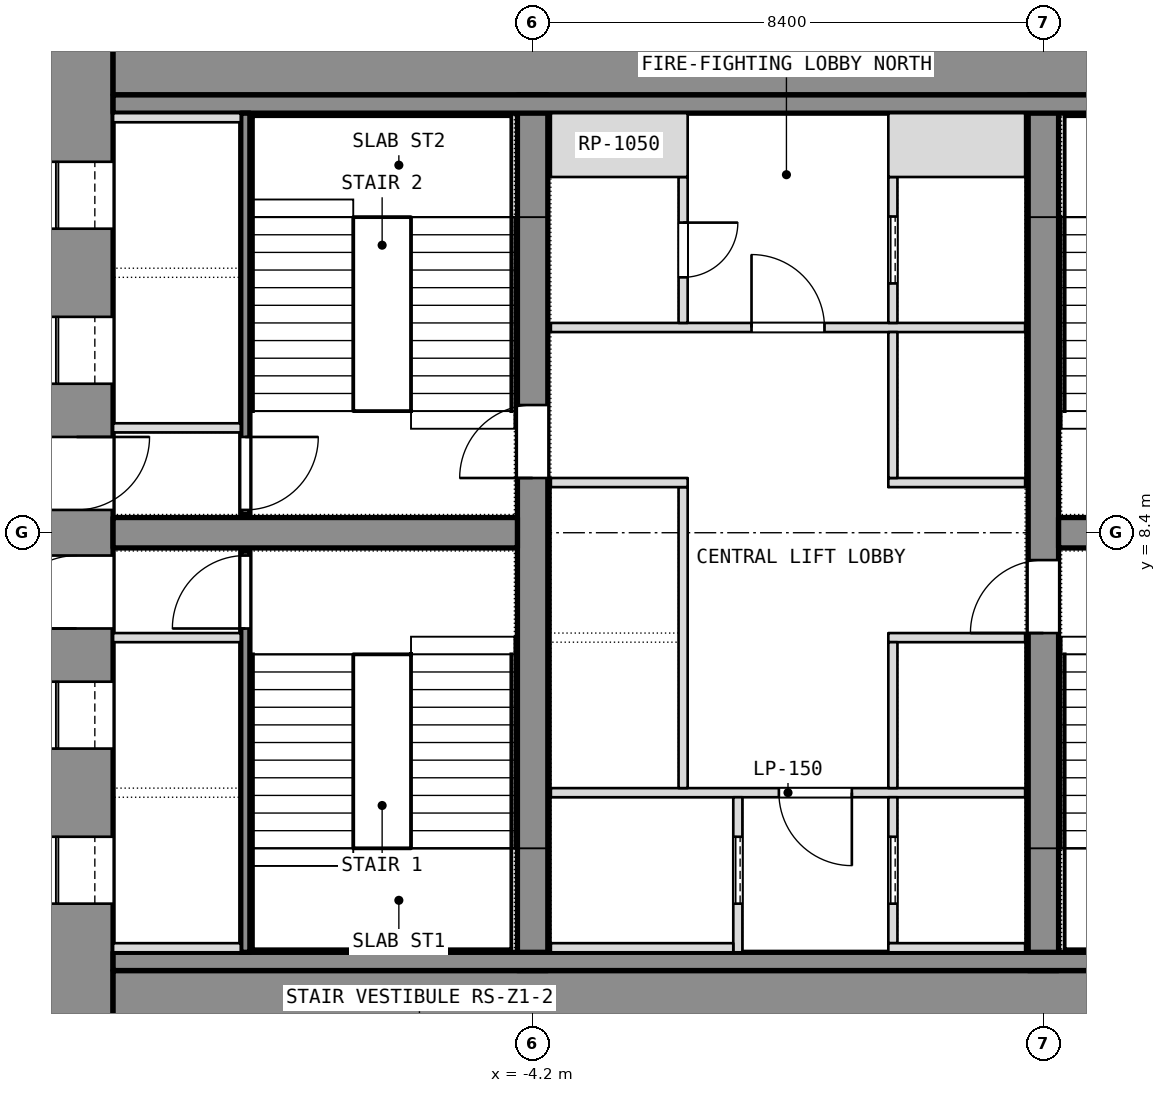
"""IFC4 building model, lengths in metres.
Left out: names, types, materials, properties, quantities, classifications, styles, units other than length and angle.
Written with IfcOpenShell. Run it as: python <this file> out.ifc"""

import sys

from ifc_helpers import new_model, si_unit, direction, frame, frame_2d, origin, place, context, subcontext, project, spatial, rectangle, extrude, element, fill, save


model = new_model("IFC4")
c1 = context("Model", 3, precision=1e-05, world=origin(), true_north=direction((0.0, 1.0)))
c2 = subcontext(c1, "Body", "Model", "MODEL_VIEW")
j1 = project(units=[si_unit("LENGTHUNIT", "METRE"), si_unit("PLANEANGLEUNIT", "RADIAN")], contexts=[c1])
p1 = place(None, origin())
s1 = spatial("IfcSite", under=j1, at=p1, CompositionType="ELEMENT")
p2 = place(p1, origin())
s2 = spatial("IfcBuilding", under=s1, at=p2, CompositionType="ELEMENT")
p3 = place(p2, frame((0.0, 0.0, 76.1)))
s3 = spatial("IfcBuildingStorey", under=s2, at=p3, CompositionType="ELEMENT", Elevation=76.1)
p4 = place(p3, frame((-11.7, 0.0, 0.0), z_axis=(0.0, 0.0, 1.0), x_axis=(0.0, 1.0, 0.0)))
e1 = element("IfcWall", 1, at=p4, inside=s3, PredefinedType="SHEAR", context=c2, shape_type="SweptSolid", body=[
    extrude(rectangle(XDim=16.8, YDim=1.2, at=frame_2d((8.4, 0.0))), origin(), (0.0, 0.0, 1.0), 3.6),
])
p5 = place(p4, frame((2.3, 0.0, 0.0)))
e2 = element("IfcOpeningElement", 2, at=p5, cuts=e1, PredefinedType="OPENING", context=c2, shape_type="SweptSolid", body=[
    extrude(rectangle(XDim=1.1, YDim=2.1, at=frame_2d((0.55, 1.05))), frame((0.0, 0.6, 0.0), z_axis=(0.0, -1.0, 0.0), x_axis=(1.0, 0.0, 0.0)), (0.0, 0.0, 1.0), 1.2),
])
p6 = place(p4, frame((4.85, 0.0, 0.0)))
e3 = element("IfcOpeningElement", 3, at=p6, cuts=e1, PredefinedType="OPENING", context=c2, shape_type="SweptSolid", body=[
    extrude(rectangle(XDim=1.1, YDim=2.1, at=frame_2d((0.55, 1.05))), frame((0.0, 0.6, 0.0), z_axis=(0.0, -1.0, 0.0), x_axis=(1.0, 0.0, 0.0)), (0.0, 0.0, 1.0), 1.2),
])
p7 = place(p4, frame((6.825, 0.0, 0.0)))
e4 = element("IfcOpeningElement", 4, at=p7, cuts=e1, PredefinedType="OPENING", context=c2, shape_type="SweptSolid", body=[
    extrude(rectangle(XDim=1.2, YDim=2.1, at=frame_2d((0.6, 1.05))), frame((0.0, 0.6, 0.0), z_axis=(0.0, -1.0, 0.0), x_axis=(1.0, 0.0, 0.0)), (0.0, 0.0, 1.0), 1.2),
])
p8 = place(p4, frame((13.4, 0.0, 0.0)))
e5 = element("IfcOpeningElement", 5, at=p8, cuts=e1, PredefinedType="OPENING", context=c2, shape_type="SweptSolid", body=[
    extrude(rectangle(XDim=1.1, YDim=2.1, at=frame_2d((0.55, 1.05))), frame((0.0, 0.6, 0.0), z_axis=(0.0, -1.0, 0.0), x_axis=(1.0, 0.0, 0.0)), (0.0, 0.0, 1.0), 1.2),
])
p9 = place(p4, frame((10.85, 0.0, 0.0)))
e6 = element("IfcOpeningElement", 6, at=p9, cuts=e1, PredefinedType="OPENING", context=c2, shape_type="SweptSolid", body=[
    extrude(rectangle(XDim=1.1, YDim=2.1, at=frame_2d((0.55, 1.05))), frame((0.0, 0.6, 0.0), z_axis=(0.0, -1.0, 0.0), x_axis=(1.0, 0.0, 0.0)), (0.0, 0.0, 1.0), 1.2),
])
p10 = place(p4, frame((8.775, 0.0, 0.0)))
e7 = element("IfcOpeningElement", 7, at=p10, cuts=e1, PredefinedType="OPENING", context=c2, shape_type="SweptSolid", body=[
    extrude(rectangle(XDim=1.2, YDim=2.1, at=frame_2d((0.6, 1.05))), frame((0.0, 0.6, 0.0), z_axis=(0.0, -1.0, 0.0), x_axis=(1.0, 0.0, 0.0)), (0.0, 0.0, 1.0), 1.2),
])
for number, where, z_axis, x_axis in (
    (8, (-11.1, 0.6, 0.0), (0.0, 0.0, 1.0), (1.0, 0.0, 0.0)),
    (9, (-11.1, 16.2, 0.0), (0.0, 0.0, 1.0), (1.0, 0.0, 0.0)),
):
    element("IfcWall", number, at=place(p3, frame(where, z_axis=z_axis, x_axis=x_axis)), inside=s3, PredefinedType="SHEAR", context=c2, shape_type="SweptSolid", body=[
        extrude(rectangle(XDim=22.2, YDim=1.2, at=frame_2d((11.1, 0.0))), origin(), (0.0, 0.0, 1.0), 3.6),
    ])
p11 = place(p3, frame((-4.2, 1.2, 0.0), z_axis=(0.0, 0.0, 1.0), x_axis=(0.0, 1.0, 0.0)))
e10 = element("IfcWall", 10, at=p11, inside=s3, PredefinedType="SHEAR", context=c2, shape_type="SweptSolid", body=[
    extrude(rectangle(XDim=14.4, YDim=0.5, at=frame_2d((7.2, 0.0))), origin(), (0.0, 0.0, 1.0), 3.6),
])
p12 = place(p11, frame((8.1, 0.0, 0.0)))
e11 = element("IfcOpeningElement", 11, at=p12, cuts=e10, PredefinedType="OPENING", context=c2, shape_type="SweptSolid", body=[
    extrude(rectangle(XDim=1.2, YDim=2.1, at=frame_2d((0.6, 1.05))), frame((0.0, 0.25, 0.0), z_axis=(0.0, -1.0, 0.0), x_axis=(1.0, 0.0, 0.0)), (0.0, 0.0, 1.0), 0.5),
])
p13 = place(p3, frame((4.2, 1.2, 0.0), z_axis=(0.0, 0.0, 1.0), x_axis=(0.0, 1.0, 0.0)))
e12 = element("IfcWall", 12, at=p13, inside=s3, PredefinedType="SHEAR", context=c2, shape_type="SweptSolid", body=[
    extrude(rectangle(XDim=14.4, YDim=0.5, at=frame_2d((7.2, 0.0))), origin(), (0.0, 0.0, 1.0), 3.6),
])
p14 = place(p13, frame((5.55, 0.0, 0.0)))
e13 = element("IfcOpeningElement", 13, at=p14, cuts=e12, PredefinedType="OPENING", context=c2, shape_type="SweptSolid", body=[
    extrude(rectangle(XDim=1.2, YDim=2.1, at=frame_2d((0.6, 1.05))), frame((0.0, 0.25, 0.0), z_axis=(0.0, -1.0, 0.0), x_axis=(1.0, 0.0, 0.0)), (0.0, 0.0, 1.0), 0.5),
])
for number, where, z_axis, x_axis in (
    (14, (-11.1, 8.4, 0.0), (0.0, 0.0, 1.0), (1.0, 0.0, 0.0)),
    (15, (4.45, 8.4, 0.0), (0.0, 0.0, 1.0), (1.0, 0.0, 0.0)),
):
    element("IfcWall", number, at=place(p3, frame(where, z_axis=z_axis, x_axis=x_axis)), inside=s3, PredefinedType="SHEAR", context=c2, shape_type="SweptSolid", body=[
        extrude(rectangle(XDim=6.65, YDim=0.5, at=frame_2d((3.325, 0.0))), origin(), (0.0, 0.0, 1.0), 3.6),
    ])
for number, where, z_axis, x_axis in (
    (16, (-11.1, 1.35, 0.0), (0.0, 0.0, 1.0), (1.0, 0.0, 0.0)),
    (17, (-11.1, 15.45, 0.0), (0.0, 0.0, 1.0), (1.0, 0.0, 0.0)),
):
    element("IfcWall", number, at=place(p3, frame(where, z_axis=z_axis, x_axis=x_axis)), inside=s3, PredefinedType="PARTITIONING", context=c2, shape_type="SweptSolid", body=[
        extrude(rectangle(XDim=22.2, YDim=0.3, at=frame_2d((11.1, 0.0))), origin(), (0.0, 0.0, 1.0), 3.34),
    ])
p15 = place(p3, frame((-8.925, 1.5, 0.0), z_axis=(0.0, 0.0, 1.0), x_axis=(0.0, 1.0, 0.0)))
e18 = element("IfcWall", 18, at=p15, inside=s3, PredefinedType="SHEAR", context=c2, shape_type="SweptSolid", body=[
    extrude(rectangle(XDim=6.6, YDim=0.15, at=frame_2d((3.3, 0.0))), origin(), (0.0, 0.0, 1.0), 3.34),
])
p16 = place(p15, frame((5.325, 0.0, 0.0)))
e19 = element("IfcOpeningElement", 19, at=p16, cuts=e18, PredefinedType="OPENING", context=c2, shape_type="SweptSolid", body=[
    extrude(rectangle(XDim=1.2, YDim=2.1, at=frame_2d((0.6, 1.05))), frame((0.0, 0.075, 0.0), z_axis=(0.0, -1.0, 0.0), x_axis=(1.0, 0.0, 0.0)), (0.0, 0.0, 1.0), 0.15),
])
for number, where, z_axis, x_axis in (
    (20, (-11.1, 6.675, 0.0), (0.0, 0.0, 1.0), (1.0, 0.0, 0.0)),
    (21, (-11.1, 1.575, 0.0), (0.0, 0.0, 1.0), (1.0, 0.0, 0.0)),
):
    element("IfcWall", number, at=place(p3, frame(where, z_axis=z_axis, x_axis=x_axis)), inside=s3, PredefinedType="SHEAR", context=c2, shape_type="SweptSolid", body=[
        extrude(rectangle(XDim=2.1, YDim=0.15, at=frame_2d((1.05, 0.0))), origin(), (0.0, 0.0, 1.0), 3.6),
    ])
p17 = place(p3, frame((-8.925, 8.7, 0.0), z_axis=(0.0, 0.0, 1.0), x_axis=(0.0, 1.0, 0.0)))
e22 = element("IfcWall", 22, at=p17, inside=s3, PredefinedType="SHEAR", context=c2, shape_type="SweptSolid", body=[
    extrude(rectangle(XDim=6.6, YDim=0.15, at=frame_2d((3.3, 0.0))), origin(), (0.0, 0.0, 1.0), 3.34),
])
p18 = place(p17, frame((0.075, 0.0, 0.0)))
e23 = element("IfcOpeningElement", 23, at=p18, cuts=e22, PredefinedType="OPENING", context=c2, shape_type="SweptSolid", body=[
    extrude(rectangle(XDim=1.2, YDim=2.1, at=frame_2d((0.6, 1.05))), frame((0.0, 0.075, 0.0), z_axis=(0.0, -1.0, 0.0), x_axis=(1.0, 0.0, 0.0)), (0.0, 0.0, 1.0), 0.15),
])
for number, where, z_axis, x_axis in (
    (24, (-11.1, 10.125, 0.0), (0.0, 0.0, 1.0), (1.0, 0.0, 0.0)),
    (25, (-11.1, 15.225, 0.0), (0.0, 0.0, 1.0), (1.0, 0.0, 0.0)),
):
    element("IfcWall", number, at=place(p3, frame(where, z_axis=z_axis, x_axis=x_axis)), inside=s3, PredefinedType="SHEAR", context=c2, shape_type="SweptSolid", body=[
        extrude(rectangle(XDim=2.1, YDim=0.15, at=frame_2d((1.05, 0.0))), origin(), (0.0, 0.0, 1.0), 3.6),
    ])
p19 = place(p3, frame((-3.9, 4.125, 0.0), z_axis=(0.0, 0.0, 1.0), x_axis=(1.0, 0.0, 0.0)))
e26 = element("IfcWall", 26, at=p19, inside=s3, PredefinedType="PARTITIONING", context=c2, shape_type="SweptSolid", body=[
    extrude(rectangle(XDim=7.8, YDim=0.15, at=frame_2d((3.9, 0.0))), origin(), (0.0, 0.0, 1.0), 3.34),
])
p20 = place(p19, frame((3.75, 0.0, 0.0)))
e27 = element("IfcOpeningElement", 27, at=p20, cuts=e26, PredefinedType="OPENING", context=c2, shape_type="SweptSolid", body=[
    extrude(rectangle(XDim=1.2, YDim=2.1, at=frame_2d((0.6, 1.05))), frame((0.0, 0.075, 0.0), z_axis=(0.0, -1.0, 0.0), x_axis=(1.0, 0.0, 0.0)), (0.0, 0.0, 1.0), 0.15),
])
p21 = place(p3, frame((-3.9, 11.775, 0.0), z_axis=(0.0, 0.0, 1.0), x_axis=(1.0, 0.0, 0.0)))
e28 = element("IfcWall", 28, at=p21, inside=s3, PredefinedType="PARTITIONING", context=c2, shape_type="SweptSolid", body=[
    extrude(rectangle(XDim=7.8, YDim=0.15, at=frame_2d((3.9, 0.0))), origin(), (0.0, 0.0, 1.0), 3.34),
])
p22 = place(p21, frame((3.3, 0.0, 0.0)))
e29 = element("IfcOpeningElement", 29, at=p22, cuts=e28, PredefinedType="OPENING", context=c2, shape_type="SweptSolid", body=[
    extrude(rectangle(XDim=1.2, YDim=2.1, at=frame_2d((0.6, 1.05))), frame((0.0, 0.075, 0.0), z_axis=(0.0, -1.0, 0.0), x_axis=(1.0, 0.0, 0.0)), (0.0, 0.0, 1.0), 0.15),
])
p23 = place(p3, frame((-0.825, 1.5, 0.0), z_axis=(0.0, 0.0, 1.0), x_axis=(0.0, 1.0, 0.0)))
e30 = element("IfcWall", 30, at=p23, inside=s3, PredefinedType="SHEAR", context=c2, shape_type="SweptSolid", body=[
    extrude(rectangle(XDim=2.55, YDim=0.15, at=frame_2d((1.275, 0.0))), origin(), (0.0, 0.0, 1.0), 3.6),
])
p24 = place(p23, frame((0.8, 0.0, 0.0)))
e31 = element("IfcOpeningElement", 31, at=p24, cuts=e30, PredefinedType="OPENING", context=c2, shape_type="SweptSolid", body=[
    extrude(rectangle(XDim=1.1, YDim=2.1, at=frame_2d((0.55, 1.05))), frame((0.0, 0.075, 0.0), z_axis=(0.0, -1.0, 0.0), x_axis=(1.0, 0.0, 0.0)), (0.0, 0.0, 1.0), 0.15),
])
p25 = place(p3, frame((-3.9, 1.575, 0.0), z_axis=(0.0, 0.0, 1.0), x_axis=(1.0, 0.0, 0.0)))
e32 = element("IfcWall", 32, at=p25, inside=s3, PredefinedType="SHEAR", context=c2, shape_type="SweptSolid", body=[
    extrude(rectangle(XDim=3.0, YDim=0.15, at=frame_2d((1.5, 0.0))), origin(), (0.0, 0.0, 1.0), 3.6),
])
p26 = place(p3, frame((-1.725, 4.2, 0.0), z_axis=(0.0, 0.0, 1.0), x_axis=(0.0, 1.0, 0.0)))
e33 = element("IfcWall", 33, at=p26, inside=s3, PredefinedType="SHEAR", context=c2, shape_type="SweptSolid", body=[
    extrude(rectangle(XDim=4.95, YDim=0.15, at=frame_2d((2.475, 0.0))), origin(), (0.0, 0.0, 1.0), 3.6),
])
p27 = place(p3, frame((-3.9, 9.225, 0.0), z_axis=(0.0, 0.0, 1.0), x_axis=(1.0, 0.0, 0.0)))
e34 = element("IfcWall", 34, at=p27, inside=s3, PredefinedType="SHEAR", context=c2, shape_type="SweptSolid", body=[
    extrude(rectangle(XDim=2.25, YDim=0.15, at=frame_2d((1.125, 0.0))), origin(), (0.0, 0.0, 1.0), 3.6),
])
p28 = place(p3, frame((-1.725, 11.85, 0.0), z_axis=(0.0, 0.0, 1.0), x_axis=(0.0, 1.0, 0.0)))
e35 = element("IfcWall", 35, at=p28, inside=s3, PredefinedType="PARTITIONING", context=c2, shape_type="SweptSolid", body=[
    extrude(rectangle(XDim=2.4, YDim=0.15, at=frame_2d((1.2, 0.0))), origin(), (0.0, 0.0, 1.0), 3.34),
])
p29 = place(p28, frame((0.75, 0.0, 0.0)))
e36 = element("IfcOpeningElement", 36, at=p29, cuts=e35, PredefinedType="OPENING", context=c2, shape_type="SweptSolid", body=[
    extrude(rectangle(XDim=0.9, YDim=2.1, at=frame_2d((0.45, 1.05))), frame((0.0, 0.075, 0.0), z_axis=(0.0, -1.0, 0.0), x_axis=(1.0, 0.0, 0.0)), (0.0, 0.0, 1.0), 0.15),
])
p30 = place(p3, frame((-3.9, 14.775, 0.0), z_axis=(0.0, 0.0, 1.0), x_axis=(1.0, 0.0, 0.0)))
e37 = element("IfcWall", 37, at=p30, inside=s3, PredefinedType="PARTITIONING", context=c2, shape_type="SweptSolid", body=[
    extrude(rectangle(XDim=2.25, YDim=1.05, at=frame_2d((1.125, 0.0))), origin(), (0.0, 0.0, 1.0), 3.34),
])
p31 = place(p3, frame((1.725, 1.65, 0.0), z_axis=(0.0, 0.0, 1.0), x_axis=(0.0, 1.0, 0.0)))
e38 = element("IfcWall", 38, at=p31, inside=s3, PredefinedType="SHEAR", context=c2, shape_type="SweptSolid", body=[
    extrude(rectangle(XDim=2.4, YDim=0.15, at=frame_2d((1.2, 0.0))), origin(), (0.0, 0.0, 1.0), 3.6),
])
p32 = place(p31, frame((0.65, 0.0, 0.0)))
e39 = element("IfcOpeningElement", 39, at=p32, cuts=e38, PredefinedType="OPENING", context=c2, shape_type="SweptSolid", body=[
    extrude(rectangle(XDim=1.1, YDim=2.1, at=frame_2d((0.55, 1.05))), frame((0.0, 0.075, 0.0), z_axis=(0.0, -1.0, 0.0), x_axis=(1.0, 0.0, 0.0)), (0.0, 0.0, 1.0), 0.15),
])
p33 = place(p3, frame((1.65, 1.575, 0.0), z_axis=(0.0, 0.0, 1.0), x_axis=(1.0, 0.0, 0.0)))
e40 = element("IfcWall", 40, at=p33, inside=s3, PredefinedType="SHEAR", context=c2, shape_type="SweptSolid", body=[
    extrude(rectangle(XDim=2.25, YDim=0.15, at=frame_2d((1.125, 0.0))), origin(), (0.0, 0.0, 1.0), 3.6),
])
p34 = place(p3, frame((1.725, 11.85, 0.0), z_axis=(0.0, 0.0, 1.0), x_axis=(0.0, 1.0, 0.0)))
e41 = element("IfcWall", 41, at=p34, inside=s3, PredefinedType="SHEAR", context=c2, shape_type="SweptSolid", body=[
    extrude(rectangle(XDim=2.4, YDim=0.15, at=frame_2d((1.2, 0.0))), origin(), (0.0, 0.0, 1.0), 3.6),
])
p35 = place(p34, frame((0.65, 0.0, 0.0)))
e42 = element("IfcOpeningElement", 42, at=p35, cuts=e41, PredefinedType="OPENING", context=c2, shape_type="SweptSolid", body=[
    extrude(rectangle(XDim=1.1, YDim=2.1, at=frame_2d((0.55, 1.05))), frame((0.0, 0.075, 0.0), z_axis=(0.0, -1.0, 0.0), x_axis=(1.0, 0.0, 0.0)), (0.0, 0.0, 1.0), 0.15),
])
p36 = place(p3, frame((1.65, 14.775, 0.0), z_axis=(0.0, 0.0, 1.0), x_axis=(1.0, 0.0, 0.0)))
e43 = element("IfcWall", 43, at=p36, inside=s3, PredefinedType="SHEAR", context=c2, shape_type="SweptSolid", body=[
    extrude(rectangle(XDim=2.25, YDim=1.05, at=frame_2d((1.125, 0.0))), origin(), (0.0, 0.0, 1.0), 3.6),
])
for number, where, z_axis, x_axis in (
    (44, (1.65, 6.675, 0.0), (0.0, 0.0, 1.0), (1.0, 0.0, 0.0)),
    (45, (1.65, 9.225, 0.0), (0.0, 0.0, 1.0), (1.0, 0.0, 0.0)),
):
    element("IfcWall", number, at=place(p3, frame(where, z_axis=z_axis, x_axis=x_axis)), inside=s3, PredefinedType="SHEAR", context=c2, shape_type="SweptSolid", body=[
        extrude(rectangle(XDim=2.25, YDim=0.15, at=frame_2d((1.125, 0.0))), origin(), (0.0, 0.0, 1.0), 3.6),
    ])
p37 = place(p3, frame((1.725, 4.2, 0.0), z_axis=(0.0, 0.0, 1.0), x_axis=(0.0, 1.0, 0.0)))
e46 = element("IfcWall", 46, at=p37, inside=s3, PredefinedType="SHEAR", context=c2, shape_type="SweptSolid", body=[
    extrude(rectangle(XDim=2.4, YDim=0.15, at=frame_2d((1.2, 0.0))), origin(), (0.0, 0.0, 1.0), 3.6),
])
p38 = place(p3, frame((1.725, 9.3, 0.0), z_axis=(0.0, 0.0, 1.0), x_axis=(0.0, 1.0, 0.0)))
e47 = element("IfcWall", 47, at=p38, inside=s3, PredefinedType="SHEAR", context=c2, shape_type="SweptSolid", body=[
    extrude(rectangle(XDim=2.4, YDim=0.15, at=frame_2d((1.2, 0.0))), origin(), (0.0, 0.0, 1.0), 3.6),
])
p39 = place(p5, origin())
e48 = element("IfcDoor", 48, at=p39, inside=s3, OperationType="SLIDING_TO_LEFT", PredefinedType="DOOR", context=c2, shape_type="SweptSolid", body=[
    extrude(rectangle(XDim=1.1, YDim=2.1, at=frame_2d((0.55, 1.05))), frame((0.0, 0.025, 0.0), z_axis=(0.0, -1.0, 0.0), x_axis=(1.0, 0.0, 0.0)), (0.0, 0.0, 1.0), 0.05),
])
fill(e2, e48)
p40 = place(p6, origin())
e49 = element("IfcDoor", 49, at=p40, inside=s3, OperationType="SLIDING_TO_LEFT", PredefinedType="DOOR", context=c2, shape_type="SweptSolid", body=[
    extrude(rectangle(XDim=1.1, YDim=2.1, at=frame_2d((0.55, 1.05))), frame((0.0, 0.025, 0.0), z_axis=(0.0, -1.0, 0.0), x_axis=(1.0, 0.0, 0.0)), (0.0, 0.0, 1.0), 0.05),
])
fill(e3, e49)
p41 = place(p7, origin())
e50 = element("IfcDoor", 50, at=p41, inside=s3, OperationType="SINGLE_SWING_LEFT", PredefinedType="DOOR", context=c2, shape_type="SweptSolid", body=[
    extrude(rectangle(XDim=1.2, YDim=2.1, at=frame_2d((0.6, 1.05))), frame((0.0, 0.025, 0.0), z_axis=(0.0, -1.0, 0.0), x_axis=(1.0, 0.0, 0.0)), (0.0, 0.0, 1.0), 0.05),
])
fill(e4, e50)
p42 = place(p16, origin())
e51 = element("IfcDoor", 51, at=p42, inside=s3, OperationType="SINGLE_SWING_LEFT", PredefinedType="DOOR", context=c2, shape_type="SweptSolid", body=[
    extrude(rectangle(XDim=1.2, YDim=2.1, at=frame_2d((0.6, 1.05))), frame((0.0, 0.025, 0.0), z_axis=(0.0, -1.0, 0.0), x_axis=(1.0, 0.0, 0.0)), (0.0, 0.0, 1.0), 0.05),
])
fill(e19, e51)
p43 = place(p8, origin())
e52 = element("IfcDoor", 52, at=p43, inside=s3, OperationType="SLIDING_TO_LEFT", PredefinedType="DOOR", context=c2, shape_type="SweptSolid", body=[
    extrude(rectangle(XDim=1.1, YDim=2.1, at=frame_2d((0.55, 1.05))), frame((0.0, 0.025, 0.0), z_axis=(0.0, -1.0, 0.0), x_axis=(1.0, 0.0, 0.0)), (0.0, 0.0, 1.0), 0.05),
])
fill(e5, e52)
p44 = place(p9, origin())
e53 = element("IfcDoor", 53, at=p44, inside=s3, OperationType="SLIDING_TO_LEFT", PredefinedType="DOOR", context=c2, shape_type="SweptSolid", body=[
    extrude(rectangle(XDim=1.1, YDim=2.1, at=frame_2d((0.55, 1.05))), frame((0.0, 0.025, 0.0), z_axis=(0.0, -1.0, 0.0), x_axis=(1.0, 0.0, 0.0)), (0.0, 0.0, 1.0), 0.05),
])
fill(e6, e53)
p45 = place(p10, origin())
e54 = element("IfcDoor", 54, at=p45, inside=s3, OperationType="SINGLE_SWING_LEFT", PredefinedType="DOOR", context=c2, shape_type="SweptSolid", body=[
    extrude(rectangle(XDim=1.2, YDim=2.1, at=frame_2d((0.6, 1.05))), frame((0.0, 0.025, 0.0), z_axis=(0.0, -1.0, 0.0), x_axis=(1.0, 0.0, 0.0)), (0.0, 0.0, 1.0), 0.05),
])
fill(e7, e54)
p46 = place(p18, origin())
e55 = element("IfcDoor", 55, at=p46, inside=s3, OperationType="SINGLE_SWING_LEFT", PredefinedType="DOOR", context=c2, shape_type="SweptSolid", body=[
    extrude(rectangle(XDim=1.2, YDim=2.1, at=frame_2d((0.6, 1.05))), frame((0.0, 0.025, 0.0), z_axis=(0.0, -1.0, 0.0), x_axis=(1.0, 0.0, 0.0)), (0.0, 0.0, 1.0), 0.05),
])
fill(e23, e55)
p47 = place(p24, origin())
e56 = element("IfcDoor", 56, at=p47, inside=s3, OperationType="SLIDING_TO_LEFT", PredefinedType="DOOR", context=c2, shape_type="SweptSolid", body=[
    extrude(rectangle(XDim=1.1, YDim=2.1, at=frame_2d((0.55, 1.05))), frame((0.0, 0.025, 0.0), z_axis=(0.0, -1.0, 0.0), x_axis=(1.0, 0.0, 0.0)), (0.0, 0.0, 1.0), 0.05),
])
fill(e31, e56)
p48 = place(p32, origin())
e57 = element("IfcDoor", 57, at=p48, inside=s3, OperationType="SLIDING_TO_LEFT", PredefinedType="DOOR", context=c2, shape_type="SweptSolid", body=[
    extrude(rectangle(XDim=1.1, YDim=2.1, at=frame_2d((0.55, 1.05))), frame((0.0, 0.025, 0.0), z_axis=(0.0, -1.0, 0.0), x_axis=(1.0, 0.0, 0.0)), (0.0, 0.0, 1.0), 0.05),
])
fill(e39, e57)
p49 = place(p35, origin())
e58 = element("IfcDoor", 58, at=p49, inside=s3, OperationType="SLIDING_TO_LEFT", PredefinedType="DOOR", context=c2, shape_type="SweptSolid", body=[
    extrude(rectangle(XDim=1.1, YDim=2.1, at=frame_2d((0.55, 1.05))), frame((0.0, 0.025, 0.0), z_axis=(0.0, -1.0, 0.0), x_axis=(1.0, 0.0, 0.0)), (0.0, 0.0, 1.0), 0.05),
])
fill(e42, e58)
p50 = place(p20, origin())
e59 = element("IfcDoor", 59, at=p50, inside=s3, OperationType="SINGLE_SWING_LEFT", PredefinedType="DOOR", context=c2, shape_type="SweptSolid", body=[
    extrude(rectangle(XDim=1.2, YDim=2.1, at=frame_2d((0.6, 1.05))), frame((0.0, 0.025, 0.0), z_axis=(0.0, -1.0, 0.0), x_axis=(1.0, 0.0, 0.0)), (0.0, 0.0, 1.0), 0.05),
])
fill(e27, e59)
p51 = place(p22, origin())
e60 = element("IfcDoor", 60, at=p51, inside=s3, OperationType="SINGLE_SWING_LEFT", PredefinedType="DOOR", context=c2, shape_type="SweptSolid", body=[
    extrude(rectangle(XDim=1.2, YDim=2.1, at=frame_2d((0.6, 1.05))), frame((0.0, 0.025, 0.0), z_axis=(0.0, -1.0, 0.0), x_axis=(1.0, 0.0, 0.0)), (0.0, 0.0, 1.0), 0.05),
])
fill(e29, e60)
p52 = place(p29, origin())
e61 = element("IfcDoor", 61, at=p52, inside=s3, OperationType="SINGLE_SWING_LEFT", PredefinedType="DOOR", context=c2, shape_type="SweptSolid", body=[
    extrude(rectangle(XDim=0.9, YDim=2.1, at=frame_2d((0.45, 1.05))), frame((0.0, 0.025, 0.0), z_axis=(0.0, -1.0, 0.0), x_axis=(1.0, 0.0, 0.0)), (0.0, 0.0, 1.0), 0.05),
])
fill(e36, e61)
p53 = place(p12, origin())
e62 = element("IfcDoor", 62, at=p53, inside=s3, OperationType="SINGLE_SWING_LEFT", PredefinedType="DOOR", context=c2, shape_type="SweptSolid", body=[
    extrude(rectangle(XDim=1.2, YDim=2.1, at=frame_2d((0.6, 1.05))), frame((0.0, 0.025, 0.0), z_axis=(0.0, -1.0, 0.0), x_axis=(1.0, 0.0, 0.0)), (0.0, 0.0, 1.0), 0.05),
])
fill(e11, e62)
p54 = place(p14, origin())
e63 = element("IfcDoor", 63, at=p54, inside=s3, OperationType="SINGLE_SWING_LEFT", PredefinedType="DOOR", context=c2, shape_type="SweptSolid", body=[
    extrude(rectangle(XDim=1.2, YDim=2.1, at=frame_2d((0.6, 1.05))), frame((0.0, 0.025, 0.0), z_axis=(0.0, -1.0, 0.0), x_axis=(1.0, 0.0, 0.0)), (0.0, 0.0, 1.0), 0.05),
])
fill(e13, e63)
save(model, sys.argv[1])
